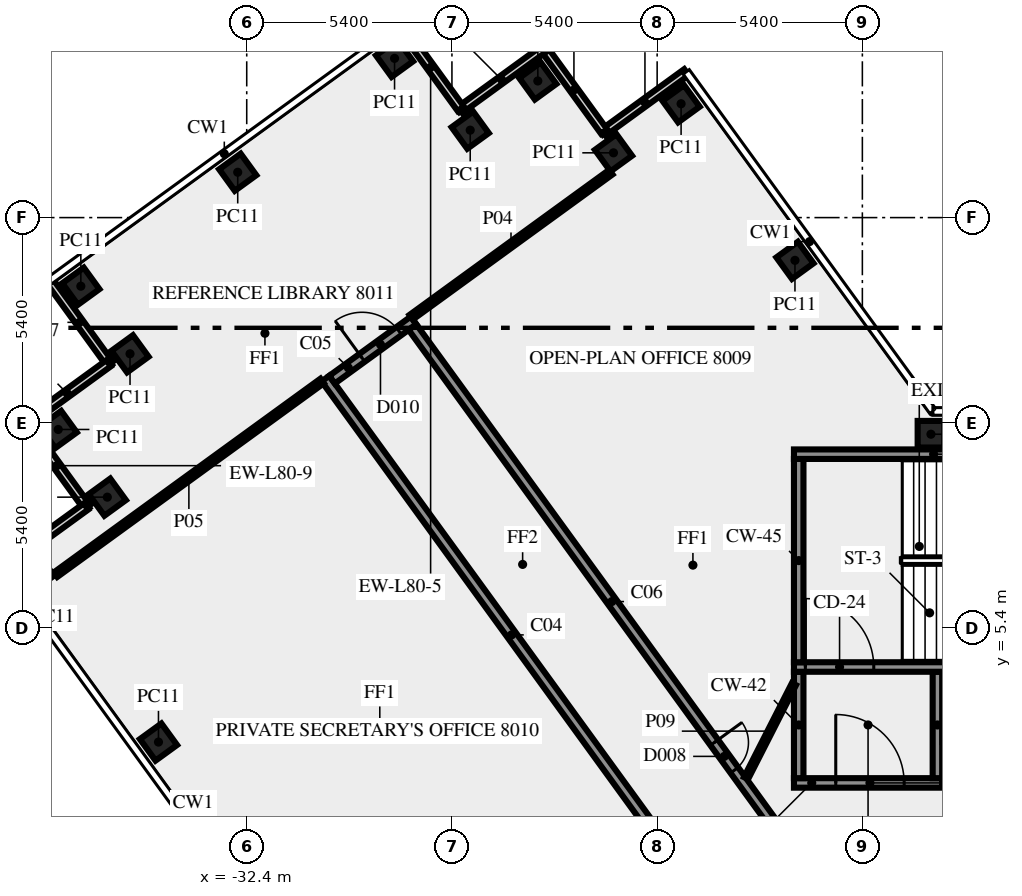
"""IFC4 building model, lengths in metres.
Left out: names, types, materials, properties, quantities, classifications, styles, units other than length and angle.
Written with IfcOpenShell. Run it as: python <this file> out.ifc"""

import sys

from ifc_helpers import new_model, si_unit, direction, frame, frame_2d, origin, origin_2d, place, context, subcontext, project, spatial, rectangle, extrude, element, fill, save


model = new_model("IFC4")
c1 = context("Model", 3, precision=1e-05, world=origin(), true_north=direction((0.0, 1.0)))
c2 = subcontext(c1, "Body", "Model", "MODEL_VIEW")
j1 = project(units=[si_unit("LENGTHUNIT", "METRE"), si_unit("PLANEANGLEUNIT", "RADIAN")], contexts=[c1])
p1 = place(None, origin())
s1 = spatial("IfcSite", under=j1, at=p1, CompositionType="ELEMENT")
p2 = place(p1, origin())
s2 = spatial("IfcBuilding", under=s1, at=p2, CompositionType="ELEMENT")
p3 = place(p2, frame((0.0, 0.0, 343.0)))
s3 = spatial("IfcBuildingStorey", under=s2, at=p3, CompositionType="ELEMENT", Elevation=343.0)
for number, where, z_axis, x_axis in (
    (1, (-17.974, 15.075, 0.0), (0.0, 0.0, 1.0), (-0.588, 0.809, 0.0)),
    (2, (-20.97, 19.195, 0.0), (0.0, 0.0, 1.0), (-0.588, 0.809, 0.0)),
    (3, (-22.749, 17.904, 0.0), (0.0, 0.0, 1.0), (-0.588, 0.809, 0.0)),
    (4, (-24.74, 19.795, 0.0), (0.0, 0.0, 1.0), (-0.588, 0.809, 0.0)),
    (5, (-26.519, 18.5, 0.0), (0.0, 0.0, 1.0), (-0.588, 0.809, 0.0)),
    (6, (-28.51, 20.39, 0.0), (0.0, 0.0, 1.0), (-0.809, -0.588, 0.0)),
    (7, (-32.637, 17.393, 0.0), (0.0, 0.0, 1.0), (-0.809, -0.588, 0.0)),
    (8, (-36.765, 14.395, 0.0), (0.0, 0.0, 1.0), (0.588, -0.809, 0.0)),
    (9, (-35.471, 12.616, 0.0), (0.0, 0.0, 1.0), (-0.809, -0.588, 0.0)),
    (10, (-37.36, 10.625, 0.0), (0.0, 0.0, 1.0), (0.588, -0.809, 0.0)),
    (11, (-36.068, 8.844, 0.0), (0.0, 0.0, 1.0), (0.588, -0.809, 0.0)),
    (12, (-37.96, 6.855, 0.0), (0.0, 0.0, 1.0), (0.588, -0.809, 0.0)),
    (13, (-34.722, 2.4, 0.0), (0.0, 0.0, 1.0), (0.588, -0.809, 0.0)),
    (14, (-14.395, 10.5, 0.0), (0.0, 0.0, 1.0), (-1.0, 0.0, 0.0)),
):
    element("IfcColumn", number, at=place(p3, frame(where, z_axis=z_axis, x_axis=x_axis)), inside=s3, PredefinedType="COLUMN", context=c2, shape_type="SweptSolid", body=[
        extrude(rectangle(XDim=0.7, YDim=0.7, at=origin_2d()), origin(), (0.0, 0.0, 1.0), 3.65),
    ])
for number, where, z_axis, x_axis in (
    (15, (-20.829, 20.025, 0.0), (0.0, 0.0, 1.0), (-0.809, -0.588, 0.0)),
    (16, (-22.996, 18.466, 0.0), (0.0, 0.0, 1.0), (-0.588, 0.809, 0.0)),
):
    element("IfcWall", number, at=place(p3, frame(where, z_axis=z_axis, x_axis=x_axis)), inside=s3, PredefinedType="SOLIDWALL", context=c2, shape_type="SweptSolid", body=[
        extrude(rectangle(XDim=2.7, YDim=0.2, at=frame_2d((1.35, 0.0))), origin(), (0.0, 0.0, 1.0), 3.65),
    ])
for number, where, z_axis, x_axis in (
    (17, (-24.6, 20.623, 0.0), (0.0, 0.0, 1.0), (-0.809, -0.588, 0.0)),
    (18, (-26.768, 19.063, 0.0), (0.0, 0.0, 1.0), (-0.588, 0.809, 0.0)),
):
    element("IfcWall", number, at=place(p3, frame(where, z_axis=z_axis, x_axis=x_axis)), inside=s3, PredefinedType="SOLIDWALL", context=c2, shape_type="SweptSolid", body=[
        extrude(rectangle(XDim=2.7, YDim=0.2, at=frame_2d((1.35, 0.0))), origin(), (0.0, 0.0, 1.0), 3.65),
    ])
for number, where, z_axis, x_axis in (
    (19, (-37.592, 14.536, 0.0), (0.0, 0.0, 1.0), (0.588, -0.809, 0.0)),
    (20, (-36.032, 12.369, 0.0), (0.0, 0.0, 1.0), (-0.809, -0.588, 0.0)),
    (21, (-38.189, 10.765, 0.0), (0.0, 0.0, 1.0), (0.588, -0.809, 0.0)),
    (22, (-36.629, 8.597, 0.0), (0.0, 0.0, 1.0), (-0.809, -0.588, 0.0)),
):
    element("IfcWall", number, at=place(p3, frame(where, z_axis=z_axis, x_axis=x_axis)), inside=s3, PredefinedType="SOLIDWALL", context=c2, shape_type="SweptSolid", body=[
        extrude(rectangle(XDim=2.7, YDim=0.2, at=frame_2d((1.35, 0.0))), origin(), (0.0, 0.0, 1.0), 3.65),
    ])
p4 = place(p3, frame((-18.0, 1.325, 0.0), z_axis=(0.0, 0.0, 1.0), x_axis=(1.0, 0.0, 0.0)))
e23 = element("IfcWall", 23, at=p4, inside=s3, PredefinedType="SHEAR", context=c2, shape_type="SweptSolid", body=[
    extrude(rectangle(XDim=3.9, YDim=0.25, at=frame_2d((1.95, 0.0))), origin(), (0.0, 0.0, 1.0), 3.65),
])
p5 = place(p4, frame((1.1, 0.0, 0.0)))
e24 = element("IfcOpeningElement", 24, at=p5, cuts=e23, PredefinedType="OPENING", context=c2, shape_type="SweptSolid", body=[
    extrude(rectangle(XDim=1.8, YDim=2.1, at=frame_2d((0.9, 1.05))), frame((0.0, 0.135, 0.0), z_axis=(0.0, -1.0, 0.0), x_axis=(1.0, 0.0, 0.0)), (0.0, 0.0, 1.0), 0.27),
])
for number, where, z_axis, x_axis in (
    (25, (-17.875, 1.45, 0.0), (0.0, 0.0, 1.0), (0.0, 1.0, 0.0)),
    (26, (-14.225, 1.45, 0.0), (0.0, 0.0, 1.0), (0.0, 1.0, 0.0)),
):
    element("IfcWall", number, at=place(p3, frame(where, z_axis=z_axis, x_axis=x_axis)), inside=s3, PredefinedType="SHEAR", context=c2, shape_type="SweptSolid", body=[
        extrude(rectangle(XDim=2.8, YDim=0.25, at=frame_2d((1.4, 0.0))), origin(), (0.0, 0.0, 1.0), 3.65),
    ])
p6 = place(p3, frame((-18.0, 4.375, 0.0), z_axis=(0.0, 0.0, 1.0), x_axis=(1.0, 0.0, 0.0)))
e27 = element("IfcWall", 27, at=p6, inside=s3, PredefinedType="SHEAR", context=c2, shape_type="SweptSolid", body=[
    extrude(rectangle(XDim=10.5, YDim=0.25, at=frame_2d((5.25, 0.0))), origin(), (0.0, 0.0, 1.0), 3.65),
])
p7 = place(p6, frame((0.3, 0.0, 0.0)))
e28 = element("IfcOpeningElement", 28, at=p7, cuts=e27, PredefinedType="OPENING", context=c2, shape_type="SweptSolid", body=[
    extrude(rectangle(XDim=1.8, YDim=2.1, at=frame_2d((0.9, 1.05))), frame((0.0, 0.135, 0.0), z_axis=(0.0, -1.0, 0.0), x_axis=(1.0, 0.0, 0.0)), (0.0, 0.0, 1.0), 0.27),
])
p8 = place(p3, frame((-17.875, 4.5, 0.0), z_axis=(0.0, 0.0, 1.0), x_axis=(0.0, 1.0, 0.0)))
e29 = element("IfcWall", 29, at=p8, inside=s3, PredefinedType="SHEAR", context=c2, shape_type="SweptSolid", body=[
    extrude(rectangle(XDim=5.35, YDim=0.25, at=frame_2d((2.675, 0.0))), origin(), (0.0, 0.0, 1.0), 3.65),
])
p9 = place(p3, frame((-18.0, 9.975, 0.0), z_axis=(0.0, 0.0, 1.0), x_axis=(1.0, 0.0, 0.0)))
e30 = element("IfcWall", 30, at=p9, inside=s3, PredefinedType="SHEAR", context=c2, shape_type="SweptSolid", body=[
    extrude(rectangle(XDim=10.5, YDim=0.25, at=frame_2d((5.25, 0.0))), origin(), (0.0, 0.0, 1.0), 3.65),
])
p10 = place(p9, frame((4.5, 0.0, 1.0)))
e31 = element("IfcOpeningElement", 31, at=p10, cuts=e30, PredefinedType="OPENING", context=c2, shape_type="SweptSolid", body=[
    extrude(rectangle(XDim=1.2, YDim=1.2, at=frame_2d((0.6, 0.6))), frame((0.0, 0.135, 0.0), z_axis=(0.0, -1.0, 0.0), x_axis=(1.0, 0.0, 0.0)), (0.0, 0.0, 1.0), 0.27),
])
p11 = place(p3, frame((-20.531, -1.523, 0.0), z_axis=(0.0, 0.0, 1.0), x_axis=(-0.587785867777, 0.809016547199, 0.0)))
e32 = element("IfcWall", 32, at=p11, inside=s3, PredefinedType="SOLIDWALL", context=c2, shape_type="SweptSolid", body=[
    extrude(rectangle(XDim=16.67, YDim=0.25, at=frame_2d((8.335, 0.0))), origin(), (0.0, 0.0, 1.0), 3.65),
])
p12 = place(p11, frame((0.533, 0.0, 0.0)))
e33 = element("IfcOpeningElement", 33, at=p12, cuts=e32, PredefinedType="OPENING", context=c2, shape_type="SweptSolid", body=[
    extrude(rectangle(XDim=0.9, YDim=2.1, at=frame_2d((0.45, 1.05))), frame((0.0, 0.135, 0.0), z_axis=(0.0, -1.0, 0.0), x_axis=(1.0, 0.0, 0.0)), (0.0, 0.0, 1.0), 0.27),
])
p13 = place(p3, frame((-30.155, 11.936, 0.0), z_axis=(0.0, 0.0, 1.0), x_axis=(0.809038743598, 0.587755315891, 0.0)))
e34 = element("IfcWall", 34, at=p13, inside=s3, PredefinedType="SOLIDWALL", context=c2, shape_type="SweptSolid", body=[
    extrude(rectangle(XDim=2.65, YDim=0.25, at=frame_2d((1.325, 0.0))), origin(), (0.0, 0.0, 1.0), 3.65),
])
p14 = place(p13, frame((0.976, 0.0, 0.0)))
e35 = element("IfcOpeningElement", 35, at=p14, cuts=e34, PredefinedType="OPENING", context=c2, shape_type="SweptSolid", body=[
    extrude(rectangle(XDim=1.2, YDim=2.1, at=frame_2d((0.6, 1.05))), frame((0.0, 0.135, 0.0), z_axis=(0.0, -1.0, 0.0), x_axis=(1.0, 0.0, 0.0)), (0.0, 0.0, 1.0), 0.27),
])
p15 = place(p3, frame((-28.039, 13.319, 0.0), z_axis=(0.0, 0.0, 1.0), x_axis=(0.587791911753, -0.809012155952, 0.0)))
e36 = element("IfcWall", 36, at=p15, inside=s3, PredefinedType="SOLIDWALL", context=c2, shape_type="SweptSolid", body=[
    extrude(rectangle(XDim=17.853, YDim=0.25, at=frame_2d((8.927, 0.0))), origin(), (0.0, 0.0, 1.0), 3.65),
])
p16 = place(p15, frame((13.512, 0.0, 0.0)))
e37 = element("IfcOpeningElement", 37, at=p16, cuts=e36, PredefinedType="OPENING", context=c2, shape_type="SweptSolid", body=[
    extrude(rectangle(XDim=0.9, YDim=2.1, at=frame_2d((0.45, 1.05))), frame((0.0, 0.135, 0.0), z_axis=(0.0, -1.0, 0.0), x_axis=(1.0, 0.0, 0.0)), (0.0, 0.0, 1.0), 0.27),
])
p17 = place(p3, frame((-22.818, 17.396, 0.0), z_axis=(0.0, 0.0, 1.0), x_axis=(-0.809000932727, -0.587807358619, 0.0)))
e38 = element("IfcWall", 38, at=p17, inside=s3, PredefinedType="PARTITIONING", context=c2, shape_type="SweptSolid", body=[
    extrude(rectangle(XDim=6.496, YDim=0.15, at=frame_2d((3.248, 0.0))), origin(), (0.0, 0.0, 1.0), 3.65),
])
p18 = place(p3, frame((-37.429, 6.805, 0.0), z_axis=(0.0, 0.0, 1.0), x_axis=(0.809020922653, 0.587779845444, 0.0)))
e39 = element("IfcWall", 39, at=p18, inside=s3, PredefinedType="PARTITIONING", context=c2, shape_type="SweptSolid", body=[
    extrude(rectangle(XDim=8.67, YDim=0.15, at=frame_2d((4.335, 0.0))), origin(), (0.0, 0.0, 1.0), 3.65),
])
p19 = place(p3, frame((-19.261, 1.45, 0.0), z_axis=(0.0, 0.0, 1.0), x_axis=(0.453950796792, 0.891026752736, 0.0)))
e40 = element("IfcWall", 40, at=p19, inside=s3, PredefinedType="PARTITIONING", context=c2, shape_type="SweptSolid", body=[
    extrude(rectangle(XDim=2.778, YDim=0.12, at=frame_2d((1.389, 0.0))), origin(), (0.0, 0.0, 1.0), 3.65),
])
p20 = place(p5, origin())
e41 = element("IfcDoor", 41, at=p20, inside=s3, OperationType="DOUBLE_DOOR_SINGLE_SWING", PredefinedType="DOOR", context=c2, shape_type="SweptSolid", body=[
    extrude(rectangle(XDim=1.8, YDim=2.1, at=frame_2d((0.9, 1.05))), frame((0.0, 0.025, 0.0), z_axis=(0.0, -1.0, 0.0), x_axis=(1.0, 0.0, 0.0)), (0.0, 0.0, 1.0), 0.05),
])
fill(e24, e41)
p21 = place(p7, origin())
e42 = element("IfcDoor", 42, at=p21, inside=s3, OperationType="DOUBLE_DOOR_SINGLE_SWING", PredefinedType="DOOR", context=c2, shape_type="SweptSolid", body=[
    extrude(rectangle(XDim=1.8, YDim=2.1, at=frame_2d((0.9, 1.05))), frame((0.0, 0.025, 0.0), z_axis=(0.0, -1.0, 0.0), x_axis=(1.0, 0.0, 0.0)), (0.0, 0.0, 1.0), 0.05),
])
fill(e28, e42)
p22 = place(p16, origin())
e43 = element("IfcDoor", 43, at=p22, inside=s3, OperationType="SINGLE_SWING_RIGHT", PredefinedType="DOOR", context=c2, shape_type="SweptSolid", body=[
    extrude(rectangle(XDim=0.9, YDim=2.1, at=frame_2d((0.45, 1.05))), frame((0.0, 0.025, 0.0), z_axis=(0.0, -1.0, 0.0), x_axis=(1.0, 0.0, 0.0)), (0.0, 0.0, 1.0), 0.05),
])
fill(e37, e43)
p23 = place(p14, origin())
e44 = element("IfcDoor", 44, at=p23, inside=s3, OperationType="SINGLE_SWING_RIGHT", PredefinedType="DOOR", context=c2, shape_type="SweptSolid", body=[
    extrude(rectangle(XDim=1.2, YDim=2.1, at=frame_2d((0.6, 1.05))), frame((0.0, 0.025, 0.0), z_axis=(0.0, -1.0, 0.0), x_axis=(1.0, 0.0, 0.0)), (0.0, 0.0, 1.0), 0.05),
])
fill(e35, e44)
save(model, sys.argv[1])
